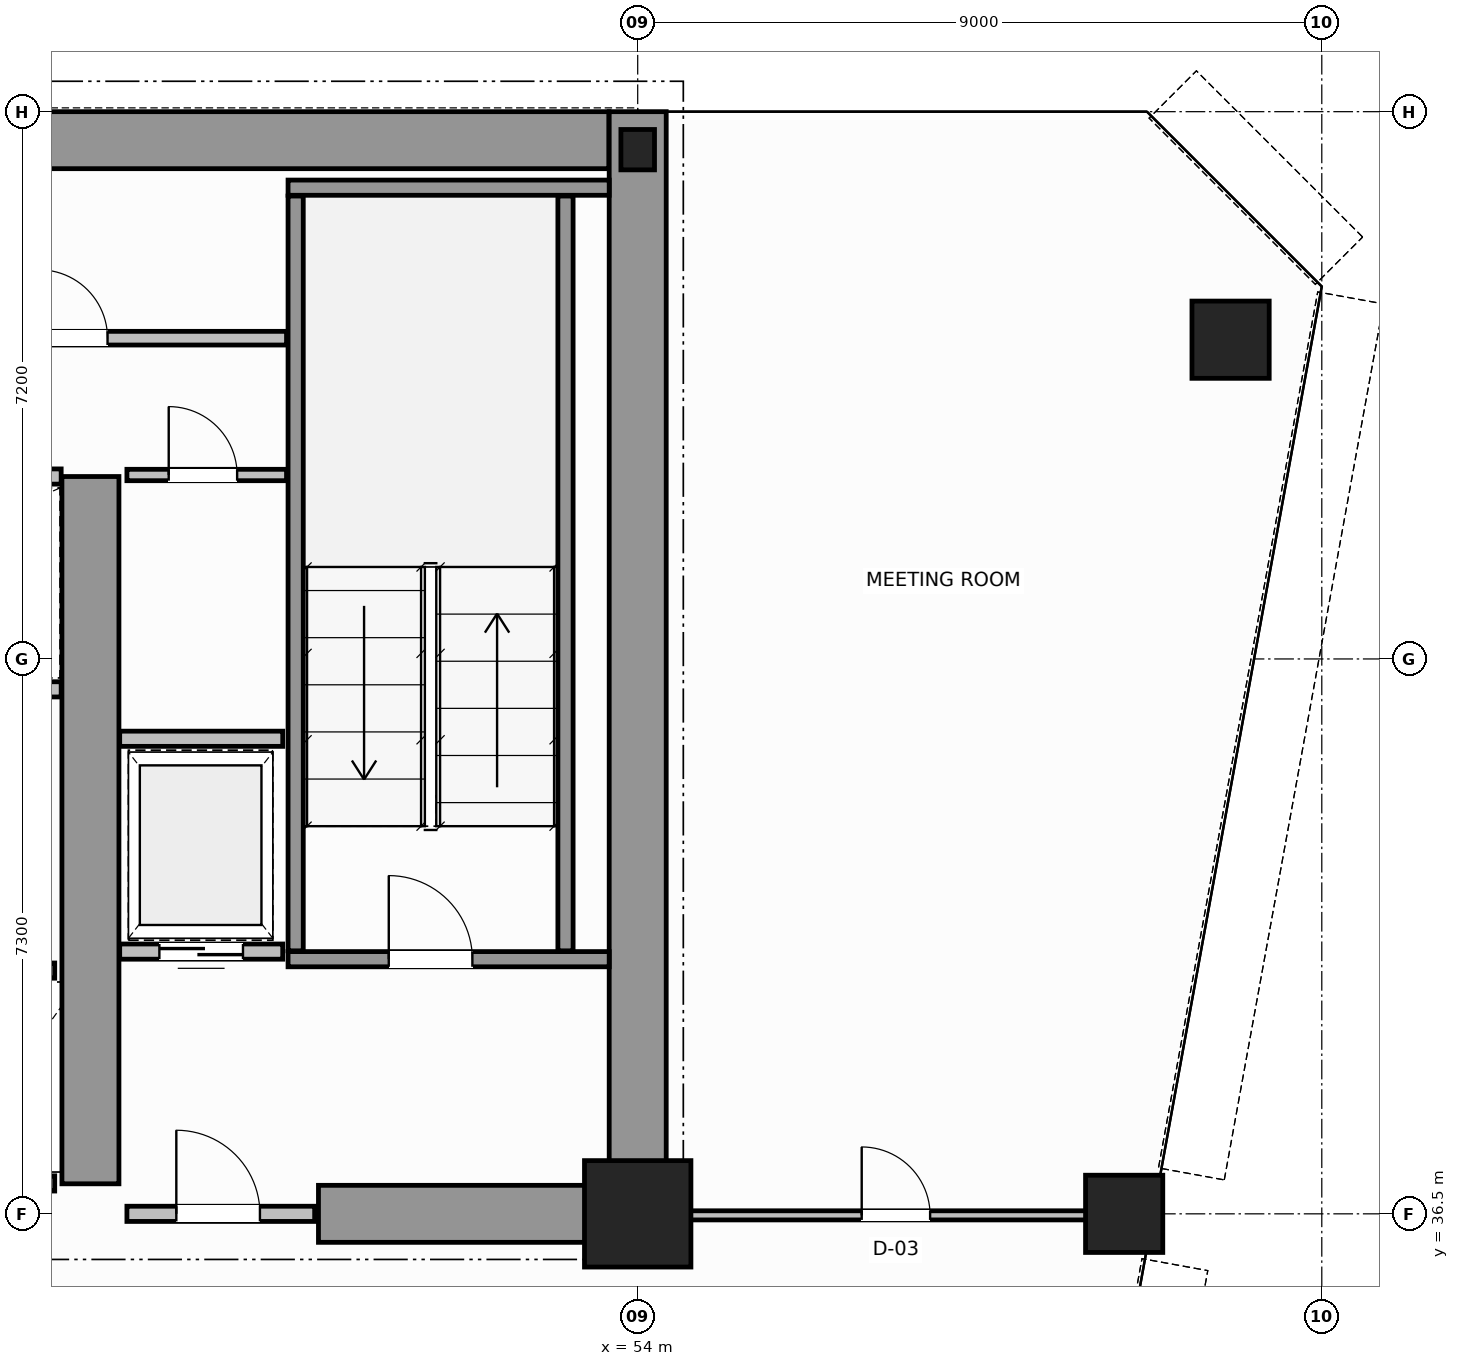
"""IFC4 building model, lengths in metres.
Left out: names, types, materials, properties, quantities, classifications, styles, units other than length and angle.
Written with IfcOpenShell. Run it as: python <this file> out.ifc"""

import sys

from ifc_helpers import new_model, si_unit, direction, frame, frame_2d, origin, origin_2d, place, context, subcontext, project, spatial, rectangle, hollow_circle, i_section, extrude, source, transform, mapped, element, fill, save


model = new_model("IFC4")
c1 = context("Model", 3, precision=1e-05, world=origin(), true_north=direction((0.0, 1.0)))
c2 = subcontext(c1, "Body", "Model", "MODEL_VIEW")
j1 = project(units=[si_unit("LENGTHUNIT", "METRE"), si_unit("PLANEANGLEUNIT", "RADIAN")], contexts=[c1])
p1 = place(None, origin())
s1 = spatial("IfcSite", under=j1, at=p1, CompositionType="ELEMENT")
p2 = place(p1, origin())
s2 = spatial("IfcBuilding", under=s1, at=p2, CompositionType="ELEMENT")
p3 = place(p2, frame((0.0, 0.0, 126.2)))
s3 = spatial("IfcBuildingStorey", under=s2, at=p3, CompositionType="ELEMENT", Elevation=126.2)
m1 = source(origin(), c2, "Body", "SweptSolid", [
    extrude(rectangle(XDim=1.4, YDim=1.4, at=origin_2d()), origin(), (0.0, 0.0, 1.0), 3.8),
])
p4 = place(p3, frame((54.0, 36.5, 0.0), z_axis=(0.0, 0.0, 1.0), x_axis=(1.0, 0.0, 0.0)))
e1 = element("IfcColumn", 1, at=p4, inside=s3, PredefinedType="COLUMN", context=c2, shape_type="MappedRepresentation", body=[
    mapped(m1, transform((0.0, 0.0, 0.0), scale=1.0)),
])
m2 = source(origin(), c2, "Body", "SweptSolid", [
    extrude(i_section(OverallWidth=0.442, OverallDepth=0.531, WebThickness=0.065, FlangeThickness=0.076, FilletRadius=0.015, at=origin_2d()), origin(), (0.0, 0.0, 1.0), 3.8),
])
p5 = place(p3, frame((54.0, 50.5, 0.0), z_axis=(0.0, 0.0, 1.0), x_axis=(1.0, 0.0, 0.0)))
e2 = element("IfcColumn", 2, at=p5, inside=s3, PredefinedType="COLUMN", context=c2, shape_type="MappedRepresentation", body=[
    mapped(m2, transform((0.0, 0.0, 0.0), scale=1.0)),
])
m3 = source(origin(), c2, "Body", "SweptSolid", [
    extrude(hollow_circle(Radius=0.508, WallThickness=0.045, at=origin_2d()), origin(), (0.0, 0.0, 1.0), 3.8),
])
for number, where, z_axis, x_axis in (
    (3, (61.8, 48.0, 0.0), (0.0, 0.0, 1.0), (1.0, 0.0, 0.0)),
    (4, (60.4, 36.5, 0.0), (0.0, 0.0, 1.0), (1.0, 0.0, 0.0)),
):
    element("IfcColumn", number, at=place(p3, frame(where, z_axis=z_axis, x_axis=x_axis)), inside=s3, PredefinedType="COLUMN", context=c2, shape_type="MappedRepresentation", body=[
        mapped(m3, transform((0.0, 0.0, 0.0), scale=1.0)),
    ])
p6 = place(p3, frame((34.002, 50.625, 0.0), z_axis=(0.0, 0.0, 1.0), x_axis=(1.0, 0.0, 0.0)))
e5 = element("IfcWall", 5, at=p6, inside=s3, PredefinedType="SHEAR", context=c2, shape_type="SweptSolid", body=[
    extrude(rectangle(XDim=19.619, YDim=0.75, at=frame_2d((9.81, 0.0))), origin(), (0.0, 0.0, 1.0), 3.8),
])
p7 = place(p3, frame((54.0, 36.5, 0.0), z_axis=(0.0, 0.0, 1.0), x_axis=(0.0, 1.0, 0.0)))
e6 = element("IfcWall", 6, at=p7, inside=s3, PredefinedType="SHEAR", context=c2, shape_type="SweptSolid", body=[
    extrude(rectangle(XDim=14.5, YDim=0.75, at=frame_2d((7.25, 0.0))), origin(), (0.0, 0.0, 1.0), 3.8),
])
p8 = place(p3, frame((49.8, 36.5, 0.0), z_axis=(0.0, 0.0, 1.0), x_axis=(1.0, 0.0, 0.0)))
e7 = element("IfcWall", 7, at=p8, inside=s3, PredefinedType="SHEAR", context=c2, shape_type="SweptSolid", body=[
    extrude(rectangle(XDim=3.805, YDim=0.75, at=frame_2d((1.902, 0.0))), origin(), (0.0, 0.0, 1.0), 2.38),
])
p9 = place(p3, frame((46.8, 36.895, 0.0), z_axis=(0.0, 0.0, 1.0), x_axis=(0.0, 1.0, 0.0)))
e8 = element("IfcWall", 8, at=p9, inside=s3, PredefinedType="SHEAR", context=c2, shape_type="SweptSolid", body=[
    extrude(rectangle(XDim=9.305, YDim=0.75, at=frame_2d((4.652, 0.0))), origin(), (0.0, 0.0, 1.0), 3.8),
])
p10 = place(p3, frame((49.4, 39.85, 0.0), z_axis=(0.0, 0.0, 1.0), x_axis=(1.0, 0.0, 0.0)))
e9 = element("IfcWall", 9, at=p10, inside=s3, PredefinedType="SOLIDWALL", context=c2, shape_type="SweptSolid", body=[
    extrude(rectangle(XDim=4.225, YDim=0.2, at=frame_2d((2.113, 0.0))), origin(), (0.0, 0.0, 1.0), 3.8),
])
p11 = place(p10, frame((1.325, 0.0, 0.0)))
e10 = element("IfcOpeningElement", 10, at=p11, cuts=e9, PredefinedType="OPENING", context=c2, shape_type="SweptSolid", body=[
    extrude(rectangle(XDim=1.1, YDim=2.15, at=frame_2d((0.55, 1.075))), frame((0.0, 0.11, 0.0), z_axis=(0.0, -1.0, 0.0), x_axis=(1.0, 0.0, 0.0)), (0.0, 0.0, 1.0), 0.22),
])
p12 = place(p3, frame((49.4, 50.0, 0.0), z_axis=(0.0, 0.0, 1.0), x_axis=(1.0, 0.0, 0.0)))
e11 = element("IfcWall", 11, at=p12, inside=s3, PredefinedType="SOLIDWALL", context=c2, shape_type="SweptSolid", body=[
    extrude(rectangle(XDim=4.225, YDim=0.2, at=frame_2d((2.113, 0.0))), origin(), (0.0, 0.0, 1.0), 3.8),
])
for number, where, z_axis, x_axis in (
    (12, (49.5, 39.96, 0.0), (0.0, 0.0, 1.0), (0.0, 1.0, 0.0)),
    (13, (53.05, 39.96, 0.0), (0.0, 0.0, 1.0), (0.0, 1.0, 0.0)),
):
    element("IfcWall", number, at=place(p3, frame(where, z_axis=z_axis, x_axis=x_axis)), inside=s3, PredefinedType="SOLIDWALL", context=c2, shape_type="SweptSolid", body=[
        extrude(rectangle(XDim=9.93, YDim=0.2, at=frame_2d((4.965, 0.0))), origin(), (0.0, 0.0, 1.0), 3.8),
    ])
p13 = place(p3, frame((47.28, 36.5, 0.0), z_axis=(0.0, 0.0, 1.0), x_axis=(1.0, 0.0, 0.0)))
e14 = element("IfcWall", 14, at=p13, inside=s3, PredefinedType="SOLIDWALL", context=c2, shape_type="SweptSolid", body=[
    extrude(rectangle(XDim=2.47, YDim=0.2, at=frame_2d((1.235, 0.0))), origin(), (0.0, 0.0, 1.0), 2.37),
])
p14 = place(p13, frame((0.65, 0.0, 0.0)))
e15 = element("IfcOpeningElement", 15, at=p14, cuts=e14, PredefinedType="OPENING", context=c2, shape_type="SweptSolid", body=[
    extrude(rectangle(XDim=1.1, YDim=2.15, at=frame_2d((0.55, 1.075))), frame((0.0, 0.11, 0.0), z_axis=(0.0, -1.0, 0.0), x_axis=(1.0, 0.0, 0.0)), (0.0, 0.0, 1.0), 0.22),
])
p15 = place(p3, frame((44.37, 39.7, 0.0), z_axis=(0.0, 0.0, 1.0), x_axis=(1.0, 0.0, 0.0)))
e16 = element("IfcWall", 16, at=p15, inside=s3, PredefinedType="SOLIDWALL", context=c2, shape_type="SweptSolid", body=[
    extrude(rectangle(XDim=1.96, YDim=0.2, at=frame_2d((0.98, 0.0))), origin(), (0.0, 0.0, 1.0), 3.58),
])
p16 = place(p3, frame((44.37, 36.9, 0.0), z_axis=(0.0, 0.0, 1.0), x_axis=(1.0, 0.0, 0.0)))
e17 = element("IfcWall", 17, at=p16, inside=s3, PredefinedType="SOLIDWALL", context=c2, shape_type="SweptSolid", body=[
    extrude(rectangle(XDim=1.96, YDim=0.2, at=frame_2d((0.98, 0.0))), origin(), (0.0, 0.0, 1.0), 2.37),
])
for number, where, z_axis, x_axis in (
    (18, (44.62, 43.4, 0.0), (0.0, 0.0, 1.0), (1.0, 0.0, 0.0)),
    (19, (44.62, 46.2, 0.0), (0.0, 0.0, 1.0), (1.0, 0.0, 0.0)),
):
    element("IfcWall", number, at=place(p3, frame(where, z_axis=z_axis, x_axis=x_axis)), inside=s3, PredefinedType="SOLIDWALL", context=c2, shape_type="SweptSolid", body=[
        extrude(rectangle(XDim=1.795, YDim=0.2, at=frame_2d((0.897, 0.0))), origin(), (0.0, 0.0, 1.0), 3.58),
    ])
p17 = place(p3, frame((47.185, 39.95, 0.0), z_axis=(0.0, 0.0, 1.0), x_axis=(1.0, 0.0, 0.0)))
e20 = element("IfcWall", 20, at=p17, inside=s3, PredefinedType="SOLIDWALL", context=c2, shape_type="SweptSolid", body=[
    extrude(rectangle(XDim=2.145, YDim=0.2, at=frame_2d((1.073, 0.0))), origin(), (0.0, 0.0, 1.0), 3.58),
])
p18 = place(p17, frame((0.522, 0.0, 0.0)))
e21 = element("IfcOpeningElement", 21, at=p18, cuts=e20, PredefinedType="OPENING", context=c2, shape_type="SweptSolid", body=[
    extrude(rectangle(XDim=1.1, YDim=2.15, at=frame_2d((0.55, 1.075))), frame((0.0, 0.11, 0.0), z_axis=(0.0, -1.0, 0.0), x_axis=(1.0, 0.0, 0.0)), (0.0, 0.0, 1.0), 0.22),
])
p19 = place(p3, frame((47.185, 42.75, 0.0), z_axis=(0.0, 0.0, 1.0), x_axis=(1.0, 0.0, 0.0)))
e22 = element("IfcWall", 22, at=p19, inside=s3, PredefinedType="SOLIDWALL", context=c2, shape_type="SweptSolid", body=[
    extrude(rectangle(XDim=2.145, YDim=0.2, at=frame_2d((1.073, 0.0))), origin(), (0.0, 0.0, 1.0), 3.58),
])
p20 = place(p3, frame((47.28, 46.22, 0.0), z_axis=(0.0, 0.0, 1.0), x_axis=(1.0, 0.0, 0.0)))
e23 = element("IfcWall", 23, at=p20, inside=s3, PredefinedType="PARTITIONING", context=c2, shape_type="SweptSolid", body=[
    extrude(rectangle(XDim=2.1, YDim=0.15, at=frame_2d((1.05, 0.0))), origin(), (0.0, 0.0, 1.0), 3.58),
])
p21 = place(p20, frame((0.55, 0.0, 0.0)))
e24 = element("IfcOpeningElement", 24, at=p21, cuts=e23, PredefinedType="OPENING", context=c2, shape_type="SweptSolid", body=[
    extrude(rectangle(XDim=0.9, YDim=2.1, at=frame_2d((0.45, 1.05))), frame((0.0, 0.085, 0.0), z_axis=(0.0, -1.0, 0.0), x_axis=(1.0, 0.0, 0.0)), (0.0, 0.0, 1.0), 0.17),
])
p22 = place(p3, frame((18.62, 48.02, 0.0), z_axis=(0.0, 0.0, 1.0), x_axis=(1.0, 0.0, 0.0)))
e25 = element("IfcWall", 25, at=p22, inside=s3, PredefinedType="PLUMBINGWALL", context=c2, shape_type="SweptSolid", body=[
    extrude(rectangle(XDim=30.76, YDim=0.18, at=frame_2d((15.38, 0.0))), origin(), (0.0, 0.0, 1.0), 3.58),
])
p23 = place(p22, frame((1.655, 0.0, 0.0)))
e26 = element("IfcOpeningElement", 26, at=p23, cuts=e25, PredefinedType="OPENING", context=c2, shape_type="SweptSolid", body=[
    extrude(rectangle(XDim=0.9, YDim=2.15, at=frame_2d((0.45, 1.075))), frame((0.0, 0.1, 0.0), z_axis=(0.0, -1.0, 0.0), x_axis=(1.0, 0.0, 0.0)), (0.0, 0.0, 1.0), 0.2),
])
p24 = place(p22, frame((6.03, 0.0, 0.0)))
e27 = element("IfcOpeningElement", 27, at=p24, cuts=e25, PredefinedType="OPENING", context=c2, shape_type="SweptSolid", body=[
    extrude(rectangle(XDim=0.9, YDim=2.15, at=frame_2d((0.45, 1.075))), frame((0.0, 0.1, 0.0), z_axis=(0.0, -1.0, 0.0), x_axis=(1.0, 0.0, 0.0)), (0.0, 0.0, 1.0), 0.2),
])
p25 = place(p22, frame((10.93, 0.0, 0.0)))
e28 = element("IfcOpeningElement", 28, at=p25, cuts=e25, PredefinedType="OPENING", context=c2, shape_type="SweptSolid", body=[
    extrude(rectangle(XDim=0.9, YDim=2.15, at=frame_2d((0.45, 1.075))), frame((0.0, 0.1, 0.0), z_axis=(0.0, -1.0, 0.0), x_axis=(1.0, 0.0, 0.0)), (0.0, 0.0, 1.0), 0.2),
])
p26 = place(p22, frame((16.13, 0.0, 0.0)))
e29 = element("IfcOpeningElement", 29, at=p26, cuts=e25, PredefinedType="OPENING", context=c2, shape_type="SweptSolid", body=[
    extrude(rectangle(XDim=0.9, YDim=2.15, at=frame_2d((0.45, 1.075))), frame((0.0, 0.1, 0.0), z_axis=(0.0, -1.0, 0.0), x_axis=(1.0, 0.0, 0.0)), (0.0, 0.0, 1.0), 0.2),
])
p27 = place(p22, frame((21.73, 0.0, 0.0)))
e30 = element("IfcOpeningElement", 30, at=p27, cuts=e25, PredefinedType="OPENING", context=c2, shape_type="SweptSolid", body=[
    extrude(rectangle(XDim=0.9, YDim=2.15, at=frame_2d((0.45, 1.075))), frame((0.0, 0.1, 0.0), z_axis=(0.0, -1.0, 0.0), x_axis=(1.0, 0.0, 0.0)), (0.0, 0.0, 1.0), 0.2),
])
p28 = place(p22, frame((27.505, 0.0, 0.0)))
e31 = element("IfcOpeningElement", 31, at=p28, cuts=e25, PredefinedType="OPENING", context=c2, shape_type="SweptSolid", body=[
    extrude(rectangle(XDim=0.9, YDim=2.15, at=frame_2d((0.45, 1.075))), frame((0.0, 0.1, 0.0), z_axis=(0.0, -1.0, 0.0), x_axis=(1.0, 0.0, 0.0)), (0.0, 0.0, 1.0), 0.2),
])
p29 = place(p3, frame((54.06, 36.48, 0.0), z_axis=(0.0, 0.0, 1.0), x_axis=(1.0, 0.0, 0.0)))
e32 = element("IfcWall", 32, at=p29, inside=s3, PredefinedType="PARTITIONING", context=c2, shape_type="SweptSolid", body=[
    extrude(rectangle(XDim=6.673, YDim=0.12, at=frame_2d((3.336, 0.0))), origin(), (0.0, 0.0, 1.0), 2.87),
])
p30 = place(p29, frame((2.887, 0.0, 0.0)))
e33 = element("IfcOpeningElement", 33, at=p30, cuts=e32, PredefinedType="OPENING", context=c2, shape_type="SweptSolid", body=[
    extrude(rectangle(XDim=0.9, YDim=2.15, at=frame_2d((0.45, 1.075))), frame((0.0, 0.07, 0.0), z_axis=(0.0, -1.0, 0.0), x_axis=(1.0, 0.0, 0.0)), (0.0, 0.0, 1.0), 0.14),
])
m4 = source(origin(), c2, "Body", "SweptSolid", [
    extrude(rectangle(XDim=1.1, YDim=2.15, at=frame_2d((0.55, 1.075))), frame((0.0, 0.025, 0.0), z_axis=(0.0, -1.0, 0.0), x_axis=(1.0, 0.0, 0.0)), (0.0, 0.0, 1.0), 0.05),
])
p31 = place(p11, origin())
e34 = element("IfcDoor", 34, at=p31, inside=s3, OperationType="SINGLE_SWING_RIGHT", PredefinedType="DOOR", context=c2, shape_type="MappedRepresentation", body=[
    mapped(m4, transform((0.0, 0.0, 0.0), scale=1.0)),
])
fill(e10, e34)
p32 = place(p14, origin())
e35 = element("IfcDoor", 35, at=p32, inside=s3, OperationType="SINGLE_SWING_LEFT", PredefinedType="DOOR", context=c2, shape_type="MappedRepresentation", body=[
    mapped(m4, transform((0.0, 0.0, 0.0), scale=1.0)),
])
fill(e15, e35)
p33 = place(p18, origin())
e36 = element("IfcDoor", 36, at=p33, inside=s3, OperationType="DOUBLE_DOOR_SLIDING", PredefinedType="DOOR", context=c2, shape_type="MappedRepresentation", body=[
    mapped(m4, transform((0.0, 0.0, 0.0), scale=1.0)),
])
fill(e21, e36)
m5 = source(origin(), c2, "Body", "SweptSolid", [
    extrude(rectangle(XDim=0.9, YDim=2.1, at=frame_2d((0.45, 1.05))), frame((0.0, 0.025, 0.0), z_axis=(0.0, -1.0, 0.0), x_axis=(1.0, 0.0, 0.0)), (0.0, 0.0, 1.0), 0.05),
])
p34 = place(p21, origin())
e37 = element("IfcDoor", 37, at=p34, inside=s3, OperationType="SINGLE_SWING_RIGHT", PredefinedType="DOOR", context=c2, shape_type="MappedRepresentation", body=[
    mapped(m5, transform((0.0, 0.0, 0.0), scale=1.0)),
])
fill(e24, e37)
m6 = source(origin(), c2, "Body", "SweptSolid", [
    extrude(rectangle(XDim=0.9, YDim=2.15, at=frame_2d((0.45, 1.075))), frame((0.0, 0.025, 0.0), z_axis=(0.0, -1.0, 0.0), x_axis=(1.0, 0.0, 0.0)), (0.0, 0.0, 1.0), 0.05),
])
p35 = place(p28, origin())
e38 = element("IfcDoor", 38, at=p35, inside=s3, OperationType="SINGLE_SWING_RIGHT", PredefinedType="DOOR", context=c2, shape_type="MappedRepresentation", body=[
    mapped(m6, transform((0.0, 0.0, 0.0), scale=1.0)),
])
fill(e31, e38)
p36 = place(p30, origin())
e39 = element("IfcDoor", 39, at=p36, inside=s3, OperationType="SINGLE_SWING_RIGHT", PredefinedType="DOOR", context=c2, shape_type="MappedRepresentation", body=[
    mapped(m6, transform((0.0, 0.0, 0.0), scale=1.0)),
])
fill(e33, e39)
save(model, sys.argv[1])
